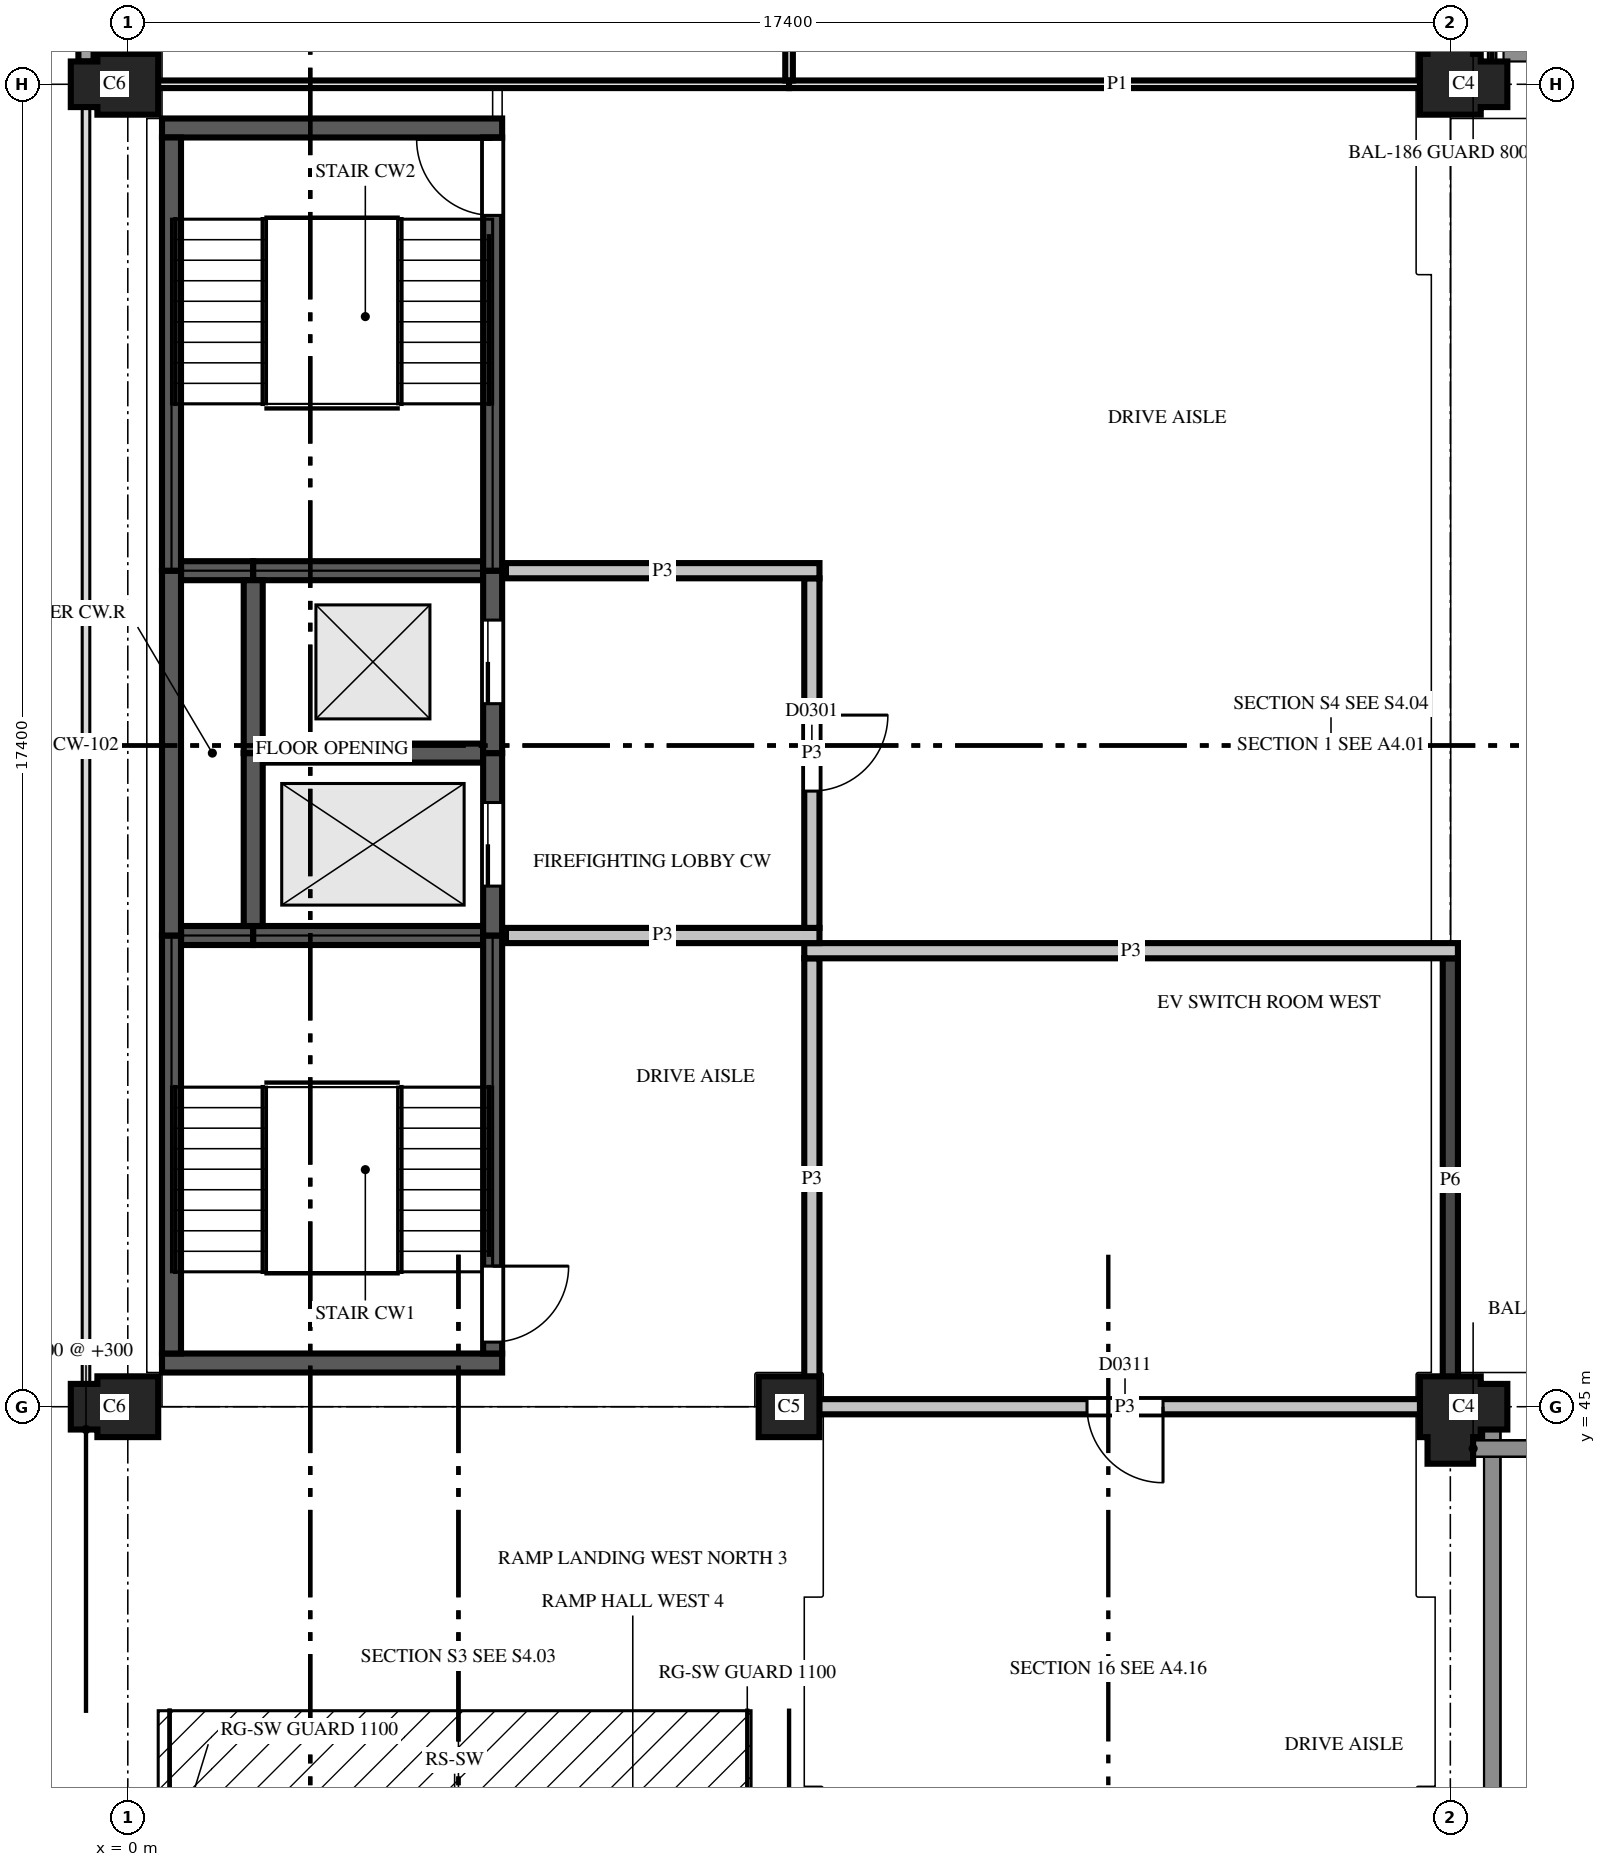
"""IFC4 building model, lengths in metres.
Left out: names, types, materials, properties, quantities, classifications, styles, units other than length and angle.
Written with IfcOpenShell. Run it as: python <this file> out.ifc"""

import sys

from ifc_helpers import new_model, si_unit, direction, frame, frame_2d, origin, place, context, subcontext, project, spatial, polyline, rectangle, outline, extrude, element, fill, save


model = new_model("IFC4")
c1 = context("Model", 3, precision=1e-05, world=origin(), true_north=direction((0.0, 1.0)))
c2 = subcontext(c1, "Body", "Model", "MODEL_VIEW")
j1 = project(units=[si_unit("LENGTHUNIT", "METRE"), si_unit("PLANEANGLEUNIT", "RADIAN")], contexts=[c1])
p1 = place(None, origin())
s1 = spatial("IfcSite", under=j1, at=p1, CompositionType="ELEMENT")
p2 = place(p1, origin())
s2 = spatial("IfcBuilding", under=s1, at=p2, CompositionType="ELEMENT")
p3 = place(p2, frame((0.0, 0.0, 11.9)))
s3 = spatial("IfcBuildingStorey", under=s2, at=p3, CompositionType="ELEMENT", Elevation=11.9)
p4 = place(p3, frame((0.0, 45.0, 0.0), z_axis=(0.0, 0.0, 1.0), x_axis=(-1.0, 0.0, 0.0)))
e1 = element("IfcColumn", 1, at=p4, inside=s3, PredefinedType="COLUMN", context=c2, shape_type="SweptSolid", body=[
    extrude(outline(polyline([(-0.4, -0.4), (0.4, -0.4), (0.4, -0.3), (0.75, -0.3), (0.75, 0.3), (0.4, 0.3), (0.4, 0.4), (-0.4, 0.4), (-0.4, -0.4)])), origin(), (0.0, 0.0, 1.0), 3.7),
])
p5 = place(p3, frame((8.7, 45.0, 0.0), z_axis=(0.0, 0.0, 1.0), x_axis=(1.0, 0.0, 0.0)))
e2 = element("IfcColumn", 2, at=p5, inside=s3, PredefinedType="COLUMN", context=c2, shape_type="SweptSolid", body=[
    extrude(outline(polyline([(-0.4, -0.4), (0.4, -0.4), (0.4, 0.4), (-0.4, 0.4), (-0.4, -0.4)])), origin(), (0.0, 0.0, 1.0), 3.7),
])
p6 = place(p3, frame((17.4, 45.0, 0.0), z_axis=(0.0, 0.0, 1.0), x_axis=(0.0, -1.0, 0.0)))
e3 = element("IfcColumn", 3, at=p6, inside=s3, PredefinedType="COLUMN", context=c2, shape_type="SweptSolid", body=[
    extrude(outline(polyline([(-0.4, -0.4), (0.4, -0.4), (0.4, -0.3), (0.75, -0.3), (0.75, 0.3), (0.4, 0.3), (0.4, 0.4), (0.3, 0.4), (0.3, 0.75), (-0.3, 0.75), (-0.3, 0.4), (-0.4, 0.4), (-0.4, -0.4)])), origin(), (0.0, 0.0, 1.0), 3.7),
])
p7 = place(p3, frame((0.0, 62.4, 0.0), z_axis=(0.0, 0.0, 1.0), x_axis=(-1.0, 0.0, 0.0)))
e4 = element("IfcColumn", 4, at=p7, inside=s3, PredefinedType="COLUMN", context=c2, shape_type="SweptSolid", body=[
    extrude(outline(polyline([(-0.4, -0.4), (0.4, -0.4), (0.4, -0.3), (0.75, -0.3), (0.75, 0.3), (0.4, 0.3), (0.4, 0.4), (-0.4, 0.4), (-0.4, -0.4)])), origin(), (0.0, 0.0, 1.0), 3.7),
])
p8 = place(p3, frame((17.4, 62.4, 0.0), z_axis=(0.0, 0.0, 1.0), x_axis=(1.0, 0.0, 0.0)))
e5 = element("IfcColumn", 5, at=p8, inside=s3, PredefinedType="COLUMN", context=c2, shape_type="SweptSolid", body=[
    extrude(outline(polyline([(-0.4, -0.4), (0.4, -0.4), (0.4, -0.3), (0.75, -0.3), (0.75, 0.3), (0.4, 0.3), (0.4, 0.4), (0.3, 0.4), (0.3, 0.75), (-0.3, 0.75), (-0.3, 0.4), (-0.4, 0.4), (-0.4, -0.4)])), origin(), (0.0, 0.0, 1.0), 3.7),
])
p9 = place(p3, frame((0.45, 45.575, 0.0), z_axis=(0.0, 0.0, 1.0), x_axis=(1.0, 0.0, 0.0)))
e6 = element("IfcWall", 6, at=p9, inside=s3, PredefinedType="SHEAR", context=c2, shape_type="SweptSolid", body=[
    extrude(rectangle(XDim=4.475, YDim=0.25, at=frame_2d((2.238, 0.0))), origin(), (0.0, 0.0, 1.0), 3.7),
])
p10 = place(p3, frame((0.7, 51.2, 0.0), z_axis=(0.0, 0.0, 1.0), x_axis=(1.0, 0.0, 0.0)))
e7 = element("IfcWall", 7, at=p10, inside=s3, PredefinedType="SHEAR", context=c2, shape_type="SweptSolid", body=[
    extrude(rectangle(XDim=0.95, YDim=0.25, at=frame_2d((0.475, 0.0))), origin(), (0.0, 0.0, 1.0), 3.7),
])
p11 = place(p3, frame((1.65, 51.2, 0.0), z_axis=(0.0, 0.0, 1.0), x_axis=(1.0, 0.0, 0.0)))
e8 = element("IfcWall", 8, at=p11, inside=s3, PredefinedType="SHEAR", context=c2, shape_type="SweptSolid", body=[
    extrude(rectangle(XDim=3.025, YDim=0.25, at=frame_2d((1.513, 0.0))), origin(), (0.0, 0.0, 1.0), 3.7),
])
p12 = place(p3, frame((1.775, 53.6, 0.0), z_axis=(0.0, 0.0, 1.0), x_axis=(1.0, 0.0, 0.0)))
e9 = element("IfcWall", 9, at=p12, inside=s3, PredefinedType="SHEAR", context=c2, shape_type="SweptSolid", body=[
    extrude(rectangle(XDim=2.9, YDim=0.25, at=frame_2d((1.45, 0.0))), origin(), (0.0, 0.0, 1.0), 3.7),
])
p13 = place(p3, frame((0.7, 56.0, 0.0), z_axis=(0.0, 0.0, 1.0), x_axis=(1.0, 0.0, 0.0)))
e10 = element("IfcWall", 10, at=p13, inside=s3, PredefinedType="SHEAR", context=c2, shape_type="SweptSolid", body=[
    extrude(rectangle(XDim=0.95, YDim=0.25, at=frame_2d((0.475, 0.0))), origin(), (0.0, 0.0, 1.0), 3.7),
])
p14 = place(p3, frame((1.65, 56.0, 0.0), z_axis=(0.0, 0.0, 1.0), x_axis=(1.0, 0.0, 0.0)))
e11 = element("IfcWall", 11, at=p14, inside=s3, PredefinedType="SHEAR", context=c2, shape_type="SweptSolid", body=[
    extrude(rectangle(XDim=3.025, YDim=0.25, at=frame_2d((1.513, 0.0))), origin(), (0.0, 0.0, 1.0), 3.7),
])
p15 = place(p3, frame((0.45, 61.825, 0.0), z_axis=(0.0, 0.0, 1.0), x_axis=(1.0, 0.0, 0.0)))
e12 = element("IfcWall", 12, at=p15, inside=s3, PredefinedType="SHEAR", context=c2, shape_type="SweptSolid", body=[
    extrude(rectangle(XDim=4.475, YDim=0.25, at=frame_2d((2.238, 0.0))), origin(), (0.0, 0.0, 1.0), 3.7),
])
p16 = place(p3, frame((0.575, 45.7, 0.0), z_axis=(0.0, 0.0, 1.0), x_axis=(0.0, 1.0, 0.0)))
e13 = element("IfcWall", 13, at=p16, inside=s3, PredefinedType="SHEAR", context=c2, shape_type="SweptSolid", body=[
    extrude(rectangle(XDim=5.5, YDim=0.25, at=frame_2d((2.75, 0.0))), origin(), (0.0, 0.0, 1.0), 3.7),
])
p17 = place(p3, frame((0.575, 51.2, 0.0), z_axis=(0.0, 0.0, 1.0), x_axis=(0.0, 1.0, 0.0)))
e14 = element("IfcWall", 14, at=p17, inside=s3, PredefinedType="SHEAR", context=c2, shape_type="SweptSolid", body=[
    extrude(rectangle(XDim=4.8, YDim=0.25, at=frame_2d((2.4, 0.0))), origin(), (0.0, 0.0, 1.0), 3.7),
])
p18 = place(p3, frame((0.575, 56.0, 0.0), z_axis=(0.0, 0.0, 1.0), x_axis=(0.0, 1.0, 0.0)))
e15 = element("IfcWall", 15, at=p18, inside=s3, PredefinedType="SHEAR", context=c2, shape_type="SweptSolid", body=[
    extrude(rectangle(XDim=5.7, YDim=0.25, at=frame_2d((2.85, 0.0))), origin(), (0.0, 0.0, 1.0), 3.7),
])
p19 = place(p3, frame((1.65, 51.325, 0.0), z_axis=(0.0, 0.0, 1.0), x_axis=(0.0, 1.0, 0.0)))
e16 = element("IfcWall", 16, at=p19, inside=s3, PredefinedType="SHEAR", context=c2, shape_type="SweptSolid", body=[
    extrude(rectangle(XDim=2.275, YDim=0.25, at=frame_2d((1.138, 0.0))), origin(), (0.0, 0.0, 1.0), 3.7),
])
p20 = place(p3, frame((1.65, 53.6, 0.0), z_axis=(0.0, 0.0, 1.0), x_axis=(0.0, 1.0, 0.0)))
e17 = element("IfcWall", 17, at=p20, inside=s3, PredefinedType="SHEAR", context=c2, shape_type="SweptSolid", body=[
    extrude(rectangle(XDim=2.275, YDim=0.25, at=frame_2d((1.137, 0.0))), origin(), (0.0, 0.0, 1.0), 3.7),
])
p21 = place(p3, frame((4.8, 45.7, 0.0), z_axis=(0.0, 0.0, 1.0), x_axis=(0.0, 1.0, 0.0)))
e18 = element("IfcWall", 18, at=p21, inside=s3, PredefinedType="SHEAR", context=c2, shape_type="SweptSolid", body=[
    extrude(rectangle(XDim=5.5, YDim=0.25, at=frame_2d((2.75, 0.0))), origin(), (0.0, 0.0, 1.0), 3.7),
])
p22 = place(p21, frame((0.15, 0.0, 0.0)))
e19 = element("IfcOpeningElement", 19, at=p22, cuts=e18, PredefinedType="OPENING", context=c2, shape_type="SweptSolid", body=[
    extrude(rectangle(XDim=1.0, YDim=2.1, at=frame_2d((0.5, 1.05))), frame((0.0, 0.135, 0.0), z_axis=(0.0, -1.0, 0.0), x_axis=(1.0, 0.0, 0.0)), (0.0, 0.0, 1.0), 0.27),
])
p23 = place(p3, frame((4.8, 51.2, 0.0), z_axis=(0.0, 0.0, 1.0), x_axis=(0.0, 1.0, 0.0)))
e20 = element("IfcWall", 20, at=p23, inside=s3, PredefinedType="SHEAR", context=c2, shape_type="SweptSolid", body=[
    extrude(rectangle(XDim=2.4, YDim=0.25, at=frame_2d((1.2, 0.0))), origin(), (0.0, 0.0, 1.0), 3.7),
])
p24 = place(p23, frame((0.65, 0.0, 0.0)))
e21 = element("IfcOpeningElement", 21, at=p24, cuts=e20, PredefinedType="OPENING", context=c2, shape_type="SweptSolid", body=[
    extrude(rectangle(XDim=1.1, YDim=2.1, at=frame_2d((0.55, 1.05))), frame((0.0, 0.135, 0.0), z_axis=(0.0, -1.0, 0.0), x_axis=(1.0, 0.0, 0.0)), (0.0, 0.0, 1.0), 0.27),
])
p25 = place(p3, frame((4.8, 53.6, 0.0), z_axis=(0.0, 0.0, 1.0), x_axis=(0.0, 1.0, 0.0)))
e22 = element("IfcWall", 22, at=p25, inside=s3, PredefinedType="SHEAR", context=c2, shape_type="SweptSolid", body=[
    extrude(rectangle(XDim=2.4, YDim=0.25, at=frame_2d((1.2, 0.0))), origin(), (0.0, 0.0, 1.0), 3.7),
])
p26 = place(p25, frame((0.65, 0.0, 0.0)))
e23 = element("IfcOpeningElement", 23, at=p26, cuts=e22, PredefinedType="OPENING", context=c2, shape_type="SweptSolid", body=[
    extrude(rectangle(XDim=1.1, YDim=2.1, at=frame_2d((0.55, 1.05))), frame((0.0, 0.135, 0.0), z_axis=(0.0, -1.0, 0.0), x_axis=(1.0, 0.0, 0.0)), (0.0, 0.0, 1.0), 0.27),
])
p27 = place(p3, frame((4.8, 56.0, 0.0), z_axis=(0.0, 0.0, 1.0), x_axis=(0.0, 1.0, 0.0)))
e24 = element("IfcWall", 24, at=p27, inside=s3, PredefinedType="SHEAR", context=c2, shape_type="SweptSolid", body=[
    extrude(rectangle(XDim=5.7, YDim=0.25, at=frame_2d((2.85, 0.0))), origin(), (0.0, 0.0, 1.0), 3.7),
])
p28 = place(p27, frame((4.675, 0.0, 0.0)))
e25 = element("IfcOpeningElement", 25, at=p28, cuts=e24, PredefinedType="OPENING", context=c2, shape_type="SweptSolid", body=[
    extrude(rectangle(XDim=1.0, YDim=2.1, at=frame_2d((0.5, 1.05))), frame((0.0, 0.135, 0.0), z_axis=(0.0, -1.0, 0.0), x_axis=(1.0, 0.0, 0.0)), (0.0, 0.0, 1.0), 0.27),
])
p29 = place(p3, frame((-0.55, 69.6, 0.0), z_axis=(0.0, 0.0, 1.0), x_axis=(0.0, -1.0, 0.0)))
e26 = element("IfcWall", 26, at=p29, inside=s3, PredefinedType="SOLIDWALL", context=c2, shape_type="SweptSolid", body=[
    extrude(rectangle(XDim=6.9, YDim=0.2, at=frame_2d((3.45, 0.0))), origin(), (0.0, 0.0, 1.0), 2.3),
])
p30 = place(p29, frame((2.25, 0.0, 0.55)))
e27 = element("IfcOpeningElement", 27, at=p30, cuts=e26, PredefinedType="OPENING", context=c2, shape_type="SweptSolid", body=[
    extrude(rectangle(XDim=2.4, YDim=1.0, at=frame_2d((1.2, 0.5))), frame((0.0, 0.11, 0.0), z_axis=(0.0, -1.0, 0.0), x_axis=(1.0, 0.0, 0.0)), (0.0, 0.0, 1.0), 0.22),
])
p31 = place(p3, frame((8.9, 45.0, 0.0), z_axis=(0.0, 0.0, 1.0), x_axis=(1.0, 0.0, 0.0)))
e28 = element("IfcWall", 28, at=p31, inside=s3, PredefinedType="PARTITIONING", context=c2, shape_type="SweptSolid", body=[
    extrude(rectangle(XDim=8.44, YDim=0.2, at=frame_2d((4.22, 0.0))), origin(), (0.0, 0.0, 1.0), 2.88),
])
p32 = place(p31, frame((3.72, 0.0, 0.0)))
e29 = element("IfcOpeningElement", 29, at=p32, cuts=e28, PredefinedType="OPENING", context=c2, shape_type="SweptSolid", body=[
    extrude(rectangle(XDim=1.0, YDim=2.1, at=frame_2d((0.5, 1.05))), frame((0.0, 0.11, 0.0), z_axis=(0.0, -1.0, 0.0), x_axis=(1.0, 0.0, 0.0)), (0.0, 0.0, 1.0), 0.22),
])
p33 = place(p3, frame((17.4, 45.06, 0.0), z_axis=(0.0, 0.0, 1.0), x_axis=(0.0, 1.0, 0.0)))
e30 = element("IfcWall", 30, at=p33, inside=s3, PredefinedType="PARTITIONING", context=c2, shape_type="SweptSolid", body=[
    extrude(rectangle(XDim=5.84, YDim=0.2, at=frame_2d((2.92, 0.0))), origin(), (0.0, 0.0, 1.0), 2.2),
])
p34 = place(p3, frame((9.0, 50.9, 0.0), z_axis=(0.0, 0.0, 1.0), x_axis=(0.0, -1.0, 0.0)))
e31 = element("IfcWall", 31, at=p34, inside=s3, PredefinedType="PARTITIONING", context=c2, shape_type="SweptSolid", body=[
    extrude(rectangle(XDim=5.8, YDim=0.2, at=frame_2d((2.9, 0.0))), origin(), (0.0, 0.0, 1.0), 2.88),
])
p35 = place(p3, frame((17.5, 51.0, 0.0), z_axis=(0.0, 0.0, 1.0), x_axis=(-1.0, 0.0, 0.0)))
e32 = element("IfcWall", 32, at=p35, inside=s3, PredefinedType="PARTITIONING", context=c2, shape_type="SweptSolid", body=[
    extrude(rectangle(XDim=8.6, YDim=0.2, at=frame_2d((4.3, 0.0))), origin(), (0.0, 0.0, 1.0), 2.88),
])
p36 = place(p3, frame((4.975, 51.2, 0.0), z_axis=(0.0, 0.0, 1.0), x_axis=(1.0, 0.0, 0.0)))
e33 = element("IfcWall", 33, at=p36, inside=s3, PredefinedType="PARTITIONING", context=c2, shape_type="SweptSolid", body=[
    extrude(rectangle(XDim=4.125, YDim=0.2, at=frame_2d((2.062, 0.0))), origin(), (0.0, 0.0, 1.0), 2.88),
])
p37 = place(p3, frame((9.0, 51.3, 0.0), z_axis=(0.0, 0.0, 1.0), x_axis=(0.0, 1.0, 0.0)))
e34 = element("IfcWall", 34, at=p37, inside=s3, PredefinedType="PARTITIONING", context=c2, shape_type="SweptSolid", body=[
    extrude(rectangle(XDim=4.6, YDim=0.2, at=frame_2d((2.3, 0.0))), origin(), (0.0, 0.0, 1.0), 2.88),
])
p38 = place(p37, frame((1.8, 0.0, 0.0)))
e35 = element("IfcOpeningElement", 35, at=p38, cuts=e34, PredefinedType="OPENING", context=c2, shape_type="SweptSolid", body=[
    extrude(rectangle(XDim=1.0, YDim=2.1, at=frame_2d((0.5, 1.05))), frame((0.0, 0.11, 0.0), z_axis=(0.0, -1.0, 0.0), x_axis=(1.0, 0.0, 0.0)), (0.0, 0.0, 1.0), 0.22),
])
p39 = place(p3, frame((9.1, 56.0, 0.0), z_axis=(0.0, 0.0, 1.0), x_axis=(-1.0, 0.0, 0.0)))
e36 = element("IfcWall", 36, at=p39, inside=s3, PredefinedType="PARTITIONING", context=c2, shape_type="SweptSolid", body=[
    extrude(rectangle(XDim=4.125, YDim=0.2, at=frame_2d((2.062, 0.0))), origin(), (0.0, 0.0, 1.0), 2.88),
])
p40 = place(p3, frame((0.06, 62.4, 0.0), z_axis=(0.0, 0.0, 1.0), x_axis=(1.0, 0.0, 0.0)))
e37 = element("IfcWall", 37, at=p40, inside=s3, PredefinedType="PARTITIONING", context=c2, shape_type="SweptSolid", body=[
    extrude(rectangle(XDim=8.64, YDim=0.1, at=frame_2d((4.32, 0.0))), origin(), (0.0, 0.0, 1.0), 2.88),
])
p41 = place(p3, frame((8.7, 62.4, 0.0), z_axis=(0.0, 0.0, 1.0), x_axis=(1.0, 0.0, 0.0)))
e38 = element("IfcWall", 38, at=p41, inside=s3, PredefinedType="PARTITIONING", context=c2, shape_type="SweptSolid", body=[
    extrude(rectangle(XDim=8.64, YDim=0.1, at=frame_2d((4.32, 0.0))), origin(), (0.0, 0.0, 1.0), 2.88),
])
p42 = place(p3, frame((8.7, 62.45, 0.0), z_axis=(0.0, 0.0, 1.0), x_axis=(0.0, 1.0, 0.0)))
e39 = element("IfcWall", 39, at=p42, inside=s3, PredefinedType="PARTITIONING", context=c2, shape_type="SweptSolid", body=[
    extrude(rectangle(XDim=22.4, YDim=0.1, at=frame_2d((11.2, 0.0))), origin(), (0.0, 0.0, 1.0), 2.88),
])
p43 = place(p38, origin())
e40 = element("IfcDoor", 40, at=p43, inside=s3, OperationType="SINGLE_SWING_RIGHT", PredefinedType="DOOR", context=c2, shape_type="SweptSolid", body=[
    extrude(rectangle(XDim=1.0, YDim=2.1, at=frame_2d((0.5, 1.05))), frame((0.0, 0.025, 0.0), z_axis=(0.0, -1.0, 0.0), x_axis=(1.0, 0.0, 0.0)), (0.0, 0.0, 1.0), 0.05),
])
fill(e35, e40)
p44 = place(p32, origin())
e41 = element("IfcDoor", 41, at=p44, inside=s3, OperationType="SINGLE_SWING_RIGHT", PredefinedType="DOOR", context=c2, shape_type="SweptSolid", body=[
    extrude(rectangle(XDim=1.0, YDim=2.1, at=frame_2d((0.5, 1.05))), frame((0.0, 0.025, 0.0), z_axis=(0.0, -1.0, 0.0), x_axis=(1.0, 0.0, 0.0)), (0.0, 0.0, 1.0), 0.05),
])
fill(e29, e41)
p45 = place(p24, origin())
e42 = element("IfcDoor", 42, at=p45, inside=s3, OperationType="SLIDING_TO_LEFT", PredefinedType="DOOR", context=c2, shape_type="SweptSolid", body=[
    extrude(rectangle(XDim=1.1, YDim=2.1, at=frame_2d((0.55, 1.05))), frame((0.0, 0.025, 0.0), z_axis=(0.0, -1.0, 0.0), x_axis=(1.0, 0.0, 0.0)), (0.0, 0.0, 1.0), 0.05),
])
fill(e21, e42)
p46 = place(p26, origin())
e43 = element("IfcDoor", 43, at=p46, inside=s3, OperationType="SLIDING_TO_LEFT", PredefinedType="DOOR", context=c2, shape_type="SweptSolid", body=[
    extrude(rectangle(XDim=1.1, YDim=2.1, at=frame_2d((0.55, 1.05))), frame((0.0, 0.025, 0.0), z_axis=(0.0, -1.0, 0.0), x_axis=(1.0, 0.0, 0.0)), (0.0, 0.0, 1.0), 0.05),
])
fill(e23, e43)
p47 = place(p28, origin())
e44 = element("IfcDoor", 44, at=p47, inside=s3, OperationType="SINGLE_SWING_LEFT", PredefinedType="DOOR", context=c2, shape_type="SweptSolid", body=[
    extrude(rectangle(XDim=1.0, YDim=2.1, at=frame_2d((0.5, 1.05))), frame((0.0, 0.025, 0.0), z_axis=(0.0, -1.0, 0.0), x_axis=(1.0, 0.0, 0.0)), (0.0, 0.0, 1.0), 0.05),
])
fill(e25, e44)
p48 = place(p22, origin())
e45 = element("IfcDoor", 45, at=p48, inside=s3, OperationType="SINGLE_SWING_RIGHT", PredefinedType="DOOR", context=c2, shape_type="SweptSolid", body=[
    extrude(rectangle(XDim=1.0, YDim=2.1, at=frame_2d((0.5, 1.05))), frame((0.0, 0.025, 0.0), z_axis=(0.0, -1.0, 0.0), x_axis=(1.0, 0.0, 0.0)), (0.0, 0.0, 1.0), 0.05),
])
fill(e19, e45)
save(model, sys.argv[1])
